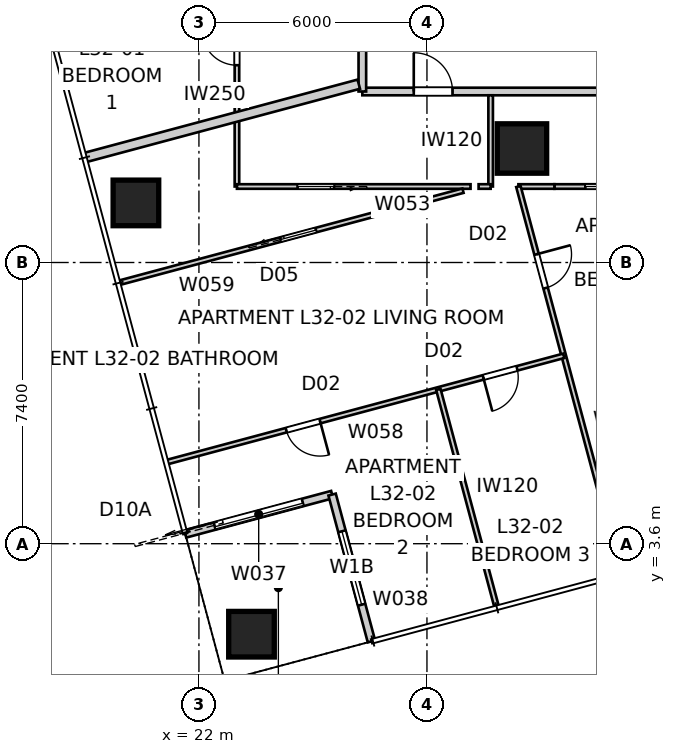
"""IFC4 building model, lengths in metres.
Left out: names, types, materials, properties, quantities, classifications, styles, units other than length and angle.
Written with IfcOpenShell. Run it as: python <this file> out.ifc"""

import sys

from ifc_helpers import new_model, si_unit, direction, frame, frame_2d, origin, origin_2d, place, context, subcontext, project, spatial, rectangle, extrude, element, fill, save


model = new_model("IFC4")
c1 = context("Model", 3, precision=1e-05, world=origin(), true_north=direction((0.0, 1.0)))
c2 = subcontext(c1, "Body", "Model", "MODEL_VIEW")
j1 = project(units=[si_unit("LENGTHUNIT", "METRE"), si_unit("PLANEANGLEUNIT", "RADIAN")], contexts=[c1])
p1 = place(None, origin())
s1 = spatial("IfcSite", under=j1, at=p1, CompositionType="ELEMENT")
p2 = place(p1, origin())
s2 = spatial("IfcBuilding", under=s1, at=p2, CompositionType="ELEMENT")
p3 = place(p2, frame((0.0, 0.0, 118.4)))
s3 = spatial("IfcBuildingStorey", under=s2, at=p3, CompositionType="ELEMENT", Elevation=118.4)
for number, where, z_axis, x_axis in (
    (1, (23.383, 1.219, 0.0), (0.0, 0.0, 1.0), (1.0, 0.0, 0.0)),
    (2, (20.342, 12.568, 0.0), (0.0, 0.0, 1.0), (1.0, 0.0, 0.0)),
):
    element("IfcColumn", number, at=place(p3, frame(where, z_axis=z_axis, x_axis=x_axis)), inside=s3, PredefinedType="COLUMN", context=c2, shape_type="SweptSolid", body=[
        extrude(rectangle(XDim=1.2, YDim=1.2, at=origin_2d()), origin(), (0.0, 0.0, 1.0), 3.4),
    ])
p4 = place(p3, frame((30.5, 14.0, 0.0), z_axis=(0.0, 0.0, 1.0), x_axis=(1.0, 0.0, 0.0)))
e3 = element("IfcColumn", 3, at=p4, inside=s3, PredefinedType="COLUMN", context=c2, shape_type="SweptSolid", body=[
    extrude(rectangle(XDim=1.3, YDim=1.3, at=origin_2d()), origin(), (0.0, 0.0, 1.0), 3.4),
])
p5 = place(p3, frame((21.641, 3.857, 0.0), z_axis=(0.0, 0.0, 1.0), x_axis=(0.965919172068, 0.258843877716, 0.0)))
e4 = element("IfcWall", 4, at=p5, inside=s3, PredefinedType="SOLIDWALL", context=c2, shape_type="SweptSolid", body=[
    extrude(rectangle(XDim=4.0, YDim=0.2, at=frame_2d((2.0, 0.0))), origin(), (0.0, 0.0, 1.0), 3.25),
])
p6 = place(p5, frame((0.8, 0.0, 0.0)))
e5 = element("IfcOpeningElement", 5, at=p6, cuts=e4, PredefinedType="OPENING", context=c2, shape_type="SweptSolid", body=[
    extrude(rectangle(XDim=2.4, YDim=2.1, at=frame_2d((1.2, 1.05))), frame((0.0, 0.11, 0.0), z_axis=(0.0, -1.0, 0.0), x_axis=(1.0, 0.0, 0.0)), (0.0, 0.0, 1.0), 0.22),
])
p7 = place(p3, frame((25.504, 4.893, 0.0), z_axis=(0.0, 0.0, 1.0), x_axis=(0.258786931944, -0.965934430412, 0.0)))
e6 = element("IfcWall", 6, at=p7, inside=s3, PredefinedType="SOLIDWALL", context=c2, shape_type="SweptSolid", body=[
    extrude(rectangle(XDim=4.0, YDim=0.2, at=frame_2d((2.0, 0.0))), origin(), (0.0, 0.0, 1.0), 3.25),
])
p8 = place(p7, frame((1.0, 0.0, 0.45)))
e7 = element("IfcOpeningElement", 7, at=p8, cuts=e6, PredefinedType="OPENING", context=c2, shape_type="SweptSolid", body=[
    extrude(rectangle(XDim=2.0, YDim=1.8, at=frame_2d((1.0, 0.9))), frame((0.0, 0.11, 0.0), z_axis=(0.0, -1.0, 0.0), x_axis=(1.0, 0.0, 0.0)), (0.0, 0.0, 1.0), 0.22),
])
p9 = place(p3, frame((26.3, 15.5, 0.0), z_axis=(0.0, 0.0, 1.0), x_axis=(1.0, 0.0, 0.0)))
e8 = element("IfcWall", 8, at=p9, inside=s3, PredefinedType="PARTITIONING", context=c2, shape_type="SweptSolid", body=[
    extrude(rectangle(XDim=28.2, YDim=0.2, at=frame_2d((14.1, 0.0))), origin(), (0.0, 0.0, 1.0), 3.25),
])
p10 = place(p9, frame((21.474, 0.0, 0.0)))
e9 = element("IfcOpeningElement", 9, at=p10, cuts=e8, PredefinedType="OPENING", context=c2, shape_type="SweptSolid", body=[
    extrude(rectangle(XDim=1.02, YDim=2.34, at=frame_2d((0.51, 1.17))), frame((0.0, 0.11, 0.0), z_axis=(0.0, -1.0, 0.0), x_axis=(1.0, 0.0, 0.0)), (0.0, 0.0, 1.0), 0.22),
])
p11 = place(p9, frame((1.353, 0.0, 0.0)))
e10 = element("IfcOpeningElement", 10, at=p11, cuts=e8, PredefinedType="OPENING", context=c2, shape_type="SweptSolid", body=[
    extrude(rectangle(XDim=1.02, YDim=2.1, at=frame_2d((0.51, 1.05))), frame((0.0, 0.11, 0.0), z_axis=(0.0, -1.0, 0.0), x_axis=(1.0, 0.0, 0.0)), (0.0, 0.0, 1.0), 0.22),
])
p12 = place(p3, frame((26.3, 42.52, 0.0), z_axis=(0.0, 0.0, 1.0), x_axis=(0.0, -1.0, 0.0)))
e11 = element("IfcWall", 11, at=p12, inside=s3, PredefinedType="PARTITIONING", context=c2, shape_type="SweptSolid", body=[
    extrude(rectangle(XDim=27.02, YDim=0.2, at=frame_2d((13.51, 0.0))), origin(), (0.0, 0.0, 1.0), 3.25),
])
p13 = place(p12, frame((23.584, 0.0, 0.0)))
e12 = element("IfcOpeningElement", 12, at=p13, cuts=e11, PredefinedType="OPENING", context=c2, shape_type="SweptSolid", body=[
    extrude(rectangle(XDim=1.02, YDim=2.1, at=frame_2d((0.51, 1.05))), frame((0.0, 0.11, 0.0), z_axis=(0.0, -1.0, 0.0), x_axis=(1.0, 0.0, 0.0)), (0.0, 0.0, 1.0), 0.22),
])
p14 = place(p12, frame((13.468, 0.0, 0.0)))
e13 = element("IfcOpeningElement", 13, at=p14, cuts=e11, PredefinedType="OPENING", context=c2, shape_type="SweptSolid", body=[
    extrude(rectangle(XDim=1.02, YDim=2.34, at=frame_2d((0.51, 1.17))), frame((0.0, 0.11, 0.0), z_axis=(0.0, -1.0, 0.0), x_axis=(1.0, 0.0, 0.0)), (0.0, 0.0, 1.0), 0.22),
])
p15 = place(p3, frame((18.988, 13.758, 0.0), z_axis=(0.0, 0.0, 1.0), x_axis=(0.965929532284, 0.258805213744, 0.0)))
e14 = element("IfcWall", 14, at=p15, inside=s3, PredefinedType="PARTITIONING", context=c2, shape_type="SweptSolid", body=[
    extrude(rectangle(XDim=7.473, YDim=0.25, at=frame_2d((3.737, 0.0))), origin(), (0.0, 0.0, 1.0), 3.25),
])
p16 = place(p3, frame((23.0, 13.0, 0.0), z_axis=(0.0, 0.0, 1.0), x_axis=(0.0, 1.0, 0.0)))
e15 = element("IfcWall", 15, at=p16, inside=s3, PredefinedType="PARTITIONING", context=c2, shape_type="SweptSolid", body=[
    extrude(rectangle(XDim=27.64, YDim=0.12, at=frame_2d((13.82, 0.0))), origin(), (0.0, 0.0, 1.0), 2.55),
])
p17 = place(p16, frame((3.192, 0.0, 0.0)))
e16 = element("IfcOpeningElement", 16, at=p17, cuts=e15, PredefinedType="OPENING", context=c2, shape_type="SweptSolid", body=[
    extrude(rectangle(XDim=0.92, YDim=2.34, at=frame_2d((0.46, 1.17))), frame((0.0, 0.07, 0.0), z_axis=(0.0, -1.0, 0.0), x_axis=(1.0, 0.0, 0.0)), (0.0, 0.0, 1.0), 0.14),
])
p18 = place(p16, frame((13.779, 0.0, 0.0)))
e17 = element("IfcOpeningElement", 17, at=p18, cuts=e15, PredefinedType="OPENING", context=c2, shape_type="SweptSolid", body=[
    extrude(rectangle(XDim=0.92, YDim=2.34, at=frame_2d((0.46, 1.17))), frame((0.0, 0.07, 0.0), z_axis=(0.0, -1.0, 0.0), x_axis=(1.0, 0.0, 0.0)), (0.0, 0.0, 1.0), 0.14),
])
p19 = place(p16, frame((16.374, 0.0, 0.0)))
e18 = element("IfcOpeningElement", 18, at=p19, cuts=e15, PredefinedType="OPENING", context=c2, shape_type="SweptSolid", body=[
    extrude(rectangle(XDim=0.92, YDim=2.34, at=frame_2d((0.46, 1.17))), frame((0.0, 0.07, 0.0), z_axis=(0.0, -1.0, 0.0), x_axis=(1.0, 0.0, 0.0)), (0.0, 0.0, 1.0), 0.14),
])
p20 = place(p16, frame((9.743, 0.0, 0.0)))
e19 = element("IfcOpeningElement", 19, at=p20, cuts=e15, PredefinedType="OPENING", context=c2, shape_type="SweptSolid", body=[
    extrude(rectangle(XDim=0.96, YDim=2.1, at=frame_2d((0.48, 1.05))), frame((0.0, 0.07, 0.0), z_axis=(0.0, -1.0, 0.0), x_axis=(1.0, 0.0, 0.0)), (0.0, 0.0, 1.0), 0.14),
])
p21 = place(p16, frame((24.879, 0.0, 0.0)))
e20 = element("IfcOpeningElement", 20, at=p21, cuts=e15, PredefinedType="OPENING", context=c2, shape_type="SweptSolid", body=[
    extrude(rectangle(XDim=0.96, YDim=2.1, at=frame_2d((0.48, 1.05))), frame((0.0, 0.07, 0.0), z_axis=(0.0, -1.0, 0.0), x_axis=(1.0, 0.0, 0.0)), (0.0, 0.0, 1.0), 0.14),
])
p22 = place(p3, frame((29.676, 15.4, 0.0), z_axis=(0.0, 0.0, 1.0), x_axis=(0.0, -1.0, 0.0)))
e21 = element("IfcWall", 21, at=p22, inside=s3, PredefinedType="PARTITIONING", context=c2, shape_type="SweptSolid", body=[
    extrude(rectangle(XDim=2.4, YDim=0.12, at=frame_2d((1.2, 0.0))), origin(), (0.0, 0.0, 1.0), 3.25),
])
p23 = place(p3, frame((29.147, 13.0, 0.0), z_axis=(0.0, 0.0, 1.0), x_axis=(-1.0, 0.0, 0.0)))
e22 = element("IfcWall", 22, at=p23, inside=s3, PredefinedType="PARTITIONING", context=c2, shape_type="SweptSolid", body=[
    extrude(rectangle(XDim=6.147, YDim=0.12, at=frame_2d((3.074, 0.0))), origin(), (0.0, 0.0, 1.0), 3.25),
])
p24 = place(p23, frame((3.591, 0.0, 0.0)))
e23 = element("IfcOpeningElement", 23, at=p24, cuts=e22, PredefinedType="OPENING", context=c2, shape_type="SweptSolid", body=[
    extrude(rectangle(XDim=0.96, YDim=2.1, at=frame_2d((0.48, 1.05))), frame((0.0, 0.07, 0.0), z_axis=(0.0, -1.0, 0.0), x_axis=(1.0, 0.0, 0.0)), (0.0, 0.0, 1.0), 0.14),
])
p25 = place(p3, frame((55.046, 13.0, 0.0), z_axis=(0.0, 0.0, 1.0), x_axis=(-1.0, 0.0, 0.0)))
e24 = element("IfcWall", 24, at=p25, inside=s3, PredefinedType="PARTITIONING", context=c2, shape_type="SweptSolid", body=[
    extrude(rectangle(XDim=23.693, YDim=0.12, at=frame_2d((11.846, 0.0))), origin(), (0.0, 0.0, 1.0), 2.55),
])
p26 = place(p25, frame((8.262, 0.0, 0.0)))
e25 = element("IfcOpeningElement", 25, at=p26, cuts=e24, PredefinedType="OPENING", context=c2, shape_type="SweptSolid", body=[
    extrude(rectangle(XDim=0.92, YDim=2.34, at=frame_2d((0.46, 1.17))), frame((0.0, 0.07, 0.0), z_axis=(0.0, -1.0, 0.0), x_axis=(1.0, 0.0, 0.0)), (0.0, 0.0, 1.0), 0.14),
])
p27 = place(p25, frame((3.825, 0.0, 0.0)))
e26 = element("IfcOpeningElement", 26, at=p27, cuts=e24, PredefinedType="OPENING", context=c2, shape_type="SweptSolid", body=[
    extrude(rectangle(XDim=0.92, YDim=2.34, at=frame_2d((0.46, 1.17))), frame((0.0, 0.07, 0.0), z_axis=(0.0, -1.0, 0.0), x_axis=(1.0, 0.0, 0.0)), (0.0, 0.0, 1.0), 0.14),
])
p28 = place(p25, frame((1.274, 0.0, 0.0)))
e27 = element("IfcOpeningElement", 27, at=p28, cuts=e24, PredefinedType="OPENING", context=c2, shape_type="SweptSolid", body=[
    extrude(rectangle(XDim=0.92, YDim=2.34, at=frame_2d((0.46, 1.17))), frame((0.0, 0.07, 0.0), z_axis=(0.0, -1.0, 0.0), x_axis=(1.0, 0.0, 0.0)), (0.0, 0.0, 1.0), 0.14),
])
p29 = place(p25, frame((13.041, 0.0, 0.0)))
e28 = element("IfcOpeningElement", 28, at=p29, cuts=e24, PredefinedType="OPENING", context=c2, shape_type="SweptSolid", body=[
    extrude(rectangle(XDim=0.96, YDim=2.1, at=frame_2d((0.48, 1.05))), frame((0.0, 0.07, 0.0), z_axis=(0.0, -1.0, 0.0), x_axis=(1.0, 0.0, 0.0)), (0.0, 0.0, 1.0), 0.14),
])
p30 = place(p25, frame((21.917, 0.0, 0.0)))
e29 = element("IfcOpeningElement", 29, at=p30, cuts=e24, PredefinedType="OPENING", context=c2, shape_type="SweptSolid", body=[
    extrude(rectangle(XDim=0.96, YDim=2.1, at=frame_2d((0.48, 1.05))), frame((0.0, 0.07, 0.0), z_axis=(0.0, -1.0, 0.0), x_axis=(1.0, 0.0, 0.0)), (0.0, 0.0, 1.0), 0.14),
])
p31 = place(p3, frame((30.406, 13.0, 0.0), z_axis=(0.0, 0.0, 1.0), x_axis=(0.258797552287, -0.965931585015, 0.0)))
e30 = element("IfcWall", 30, at=p31, inside=s3, PredefinedType="PARTITIONING", context=c2, shape_type="SweptSolid", body=[
    extrude(rectangle(XDim=10.522, YDim=0.12, at=frame_2d((5.261, 0.0))), origin(), (0.0, 0.0, 1.0), 2.722),
])
p32 = place(p31, frame((1.846, 0.0, 0.0)))
e31 = element("IfcOpeningElement", 31, at=p32, cuts=e30, PredefinedType="OPENING", context=c2, shape_type="SweptSolid", body=[
    extrude(rectangle(XDim=0.92, YDim=2.34, at=frame_2d((0.46, 1.17))), frame((0.0, 0.07, 0.0), z_axis=(0.0, -1.0, 0.0), x_axis=(1.0, 0.0, 0.0)), (0.0, 0.0, 1.0), 0.14),
])
p33 = place(p3, frame((31.6, 8.544, 0.0), z_axis=(0.0, 0.0, 1.0), x_axis=(-0.965927151587, -0.258814098973, 0.0)))
e32 = element("IfcWall", 32, at=p33, inside=s3, PredefinedType="PARTITIONING", context=c2, shape_type="SweptSolid", body=[
    extrude(rectangle(XDim=10.793, YDim=0.12, at=frame_2d((5.396, 0.0))), origin(), (0.0, 0.0, 1.0), 3.25),
])
p34 = place(p33, frame((6.64, 0.0, 0.0)))
e33 = element("IfcOpeningElement", 33, at=p34, cuts=e32, PredefinedType="OPENING", context=c2, shape_type="SweptSolid", body=[
    extrude(rectangle(XDim=0.92, YDim=2.34, at=frame_2d((0.46, 1.17))), frame((0.0, 0.07, 0.0), z_axis=(0.0, -1.0, 0.0), x_axis=(1.0, 0.0, 0.0)), (0.0, 0.0, 1.0), 0.14),
])
p35 = place(p33, frame((1.273, 0.0, 0.0)))
e34 = element("IfcOpeningElement", 34, at=p35, cuts=e32, PredefinedType="OPENING", context=c2, shape_type="SweptSolid", body=[
    extrude(rectangle(XDim=0.92, YDim=2.34, at=frame_2d((0.46, 1.17))), frame((0.0, 0.07, 0.0), z_axis=(0.0, -1.0, 0.0), x_axis=(1.0, 0.0, 0.0)), (0.0, 0.0, 1.0), 0.14),
])
p36 = place(p3, frame((19.911, 10.468, 0.0), z_axis=(0.0, 0.0, 1.0), x_axis=(0.965927203676, 0.25881390457, 0.0)))
e35 = element("IfcWall", 35, at=p36, inside=s3, PredefinedType="PARTITIONING", context=c2, shape_type="SweptSolid", body=[
    extrude(rectangle(XDim=9.357, YDim=0.12, at=frame_2d((4.678, 0.0))), origin(), (0.0, 0.0, 1.0), 2.638),
])
p37 = place(p36, frame((4.391, 0.0, 0.0)))
e36 = element("IfcOpeningElement", 36, at=p37, cuts=e35, PredefinedType="OPENING", context=c2, shape_type="SweptSolid", body=[
    extrude(rectangle(XDim=0.96, YDim=2.1, at=frame_2d((0.48, 1.05))), frame((0.0, 0.07, 0.0), z_axis=(0.0, -1.0, 0.0), x_axis=(1.0, 0.0, 0.0)), (0.0, 0.0, 1.0), 0.14),
])
p38 = place(p3, frame((28.3, 7.66, 0.0), z_axis=(0.0, 0.0, 1.0), x_axis=(0.25882212607, -0.965925000741, 0.0)))
e37 = element("IfcWall", 37, at=p38, inside=s3, PredefinedType="PARTITIONING", context=c2, shape_type="SweptSolid", body=[
    extrude(rectangle(XDim=5.91, YDim=0.12, at=frame_2d((2.955, 0.0))), origin(), (0.0, 0.0, 1.0), 3.25),
])
p39 = place(p3, frame((29.676, 13.0, 0.0), z_axis=(0.0, 0.0, 1.0), x_axis=(-1.0, 0.0, 0.0)))
e38 = element("IfcWall", 38, at=p39, inside=s3, PredefinedType="PARTITIONING", context=c2, shape_type="SweptSolid", body=[
    extrude(rectangle(XDim=0.317, YDim=0.12, at=frame_2d((0.158, 0.0))), origin(), (0.0, 0.0, 1.0), 3.25),
])
p40 = place(p3, frame((31.354, 13.0, 0.0), z_axis=(0.0, 0.0, 1.0), x_axis=(-1.0, 0.0, 0.0)))
e39 = element("IfcWall", 39, at=p40, inside=s3, PredefinedType="PARTITIONING", context=c2, shape_type="SweptSolid", body=[
    extrude(rectangle(XDim=0.947, YDim=0.12, at=frame_2d((0.474, 0.0))), origin(), (0.0, 0.0, 1.0), 3.25),
])
p41 = place(p6, origin())
e40 = element("IfcDoor", 40, at=p41, inside=s3, OperationType="SLIDING_TO_LEFT", PredefinedType="DOOR", context=c2, shape_type="SweptSolid", body=[
    extrude(rectangle(XDim=2.4, YDim=2.1, at=frame_2d((1.2, 1.05))), frame((0.0, 0.025, 0.0), z_axis=(0.0, -1.0, 0.0), x_axis=(1.0, 0.0, 0.0)), (0.0, 0.0, 1.0), 0.05),
])
fill(e5, e40)
p42 = place(p8, origin())
e41 = element("IfcWindow", 41, at=p42, inside=s3, PartitioningType="SINGLE_PANEL", PredefinedType="WINDOW", context=c2, shape_type="SweptSolid", body=[
    extrude(rectangle(XDim=2.0, YDim=1.8, at=frame_2d((1.0, 0.9))), frame((0.0, 0.03, 0.0), z_axis=(0.0, -1.0, 0.0), x_axis=(1.0, 0.0, 0.0)), (0.0, 0.0, 1.0), 0.06),
])
fill(e7, e41)
p43 = place(p11, origin())
e42 = element("IfcDoor", 42, at=p43, inside=s3, OperationType="SINGLE_SWING_LEFT", PredefinedType="DOOR", context=c2, shape_type="SweptSolid", body=[
    extrude(rectangle(XDim=1.02, YDim=2.1, at=frame_2d((0.51, 1.05))), frame((0.0, 0.025, 0.0), z_axis=(0.0, -1.0, 0.0), x_axis=(1.0, 0.0, 0.0)), (0.0, 0.0, 1.0), 0.05),
])
fill(e10, e42)
p44 = place(p17, origin())
e43 = element("IfcDoor", 43, at=p44, inside=s3, OperationType="SINGLE_SWING_RIGHT", PredefinedType="DOOR", context=c2, shape_type="SweptSolid", body=[
    extrude(rectangle(XDim=0.92, YDim=2.34, at=frame_2d((0.46, 1.17))), frame((0.0, 0.025, 0.0), z_axis=(0.0, -1.0, 0.0), x_axis=(1.0, 0.0, 0.0)), (0.0, 0.0, 1.0), 0.05),
])
fill(e16, e43)
p45 = place(p24, origin())
e44 = element("IfcDoor", 44, at=p45, inside=s3, OperationType="SLIDING_TO_LEFT", PredefinedType="DOOR", context=c2, shape_type="SweptSolid", body=[
    extrude(rectangle(XDim=0.96, YDim=2.1, at=frame_2d((0.48, 1.05))), frame((0.0, 0.025, 0.0), z_axis=(0.0, -1.0, 0.0), x_axis=(1.0, 0.0, 0.0)), (0.0, 0.0, 1.0), 0.05),
])
fill(e23, e44)
p46 = place(p37, origin())
e45 = element("IfcDoor", 45, at=p46, inside=s3, OperationType="SLIDING_TO_LEFT", PredefinedType="DOOR", context=c2, shape_type="SweptSolid", body=[
    extrude(rectangle(XDim=0.96, YDim=2.1, at=frame_2d((0.48, 1.05))), frame((0.0, 0.025, 0.0), z_axis=(0.0, -1.0, 0.0), x_axis=(1.0, 0.0, 0.0)), (0.0, 0.0, 1.0), 0.05),
])
fill(e36, e45)
p47 = place(p34, origin())
e46 = element("IfcDoor", 46, at=p47, inside=s3, OperationType="SINGLE_SWING_LEFT", PredefinedType="DOOR", context=c2, shape_type="SweptSolid", body=[
    extrude(rectangle(XDim=0.92, YDim=2.34, at=frame_2d((0.46, 1.17))), frame((0.0, 0.025, 0.0), z_axis=(0.0, -1.0, 0.0), x_axis=(1.0, 0.0, 0.0)), (0.0, 0.0, 1.0), 0.05),
])
fill(e33, e46)
p48 = place(p32, origin())
e47 = element("IfcDoor", 47, at=p48, inside=s3, OperationType="SINGLE_SWING_LEFT", PredefinedType="DOOR", context=c2, shape_type="SweptSolid", body=[
    extrude(rectangle(XDim=0.92, YDim=2.34, at=frame_2d((0.46, 1.17))), frame((0.0, 0.025, 0.0), z_axis=(0.0, -1.0, 0.0), x_axis=(1.0, 0.0, 0.0)), (0.0, 0.0, 1.0), 0.05),
])
fill(e31, e47)
p49 = place(p35, origin())
e48 = element("IfcDoor", 48, at=p49, inside=s3, OperationType="SINGLE_SWING_RIGHT", PredefinedType="DOOR", context=c2, shape_type="SweptSolid", body=[
    extrude(rectangle(XDim=0.92, YDim=2.34, at=frame_2d((0.46, 1.17))), frame((0.0, 0.025, 0.0), z_axis=(0.0, -1.0, 0.0), x_axis=(1.0, 0.0, 0.0)), (0.0, 0.0, 1.0), 0.05),
])
fill(e34, e48)
p50 = place(p30, origin())
e49 = element("IfcDoor", 49, at=p50, inside=s3, OperationType="SLIDING_TO_LEFT", PredefinedType="DOOR", context=c2, shape_type="SweptSolid", body=[
    extrude(rectangle(XDim=0.96, YDim=2.1, at=frame_2d((0.48, 1.05))), frame((0.0, 0.025, 0.0), z_axis=(0.0, -1.0, 0.0), x_axis=(1.0, 0.0, 0.0)), (0.0, 0.0, 1.0), 0.05),
])
fill(e29, e49)
save(model, sys.argv[1])
